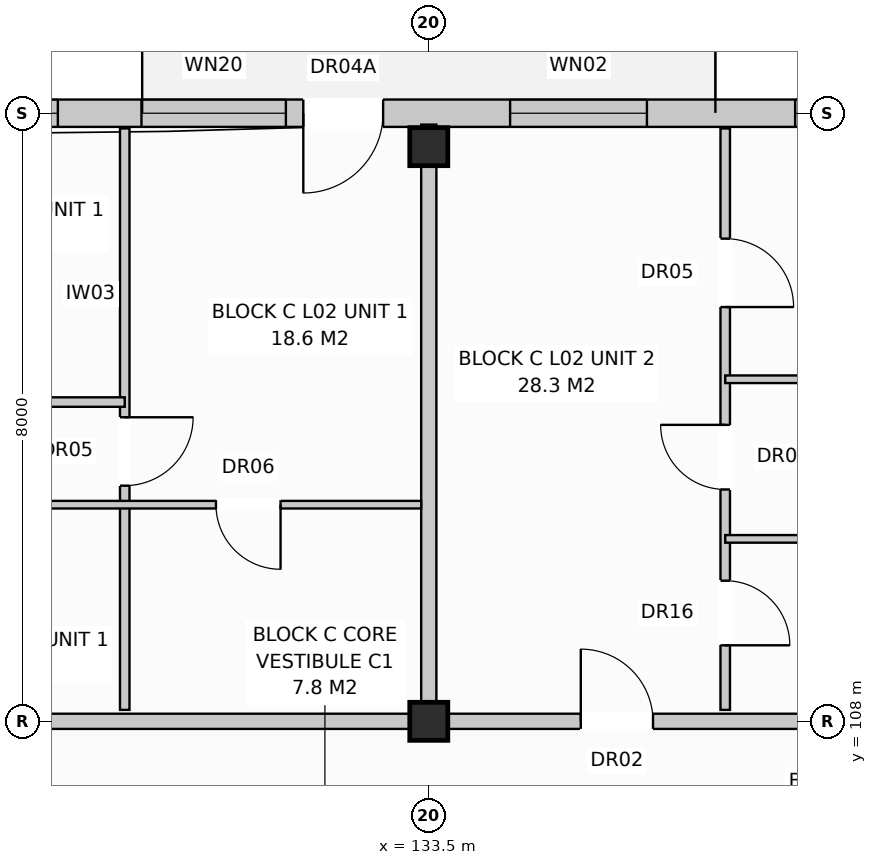
"""IFC4 building model, lengths in metres.
Left out: names, types, materials, properties, quantities, classifications, styles, units other than length and angle.
Written with IfcOpenShell. Run it as: python <this file> out.ifc"""

import sys

from ifc_helpers import new_model, si_unit, direction, frame, frame_2d, origin, origin_with_axes, origin_2d, place, context, subcontext, project, spatial, rectangle, extrude, element, fill, save


model = new_model("IFC4")
c1 = context("Model", 3, precision=1e-05, world=origin(), true_north=direction((0.0, 1.0)))
c2 = subcontext(c1, "Body", "Model", "MODEL_VIEW")
j1 = project(units=[si_unit("LENGTHUNIT", "METRE"), si_unit("PLANEANGLEUNIT", "RADIAN")], contexts=[c1])
p1 = place(None, origin())
s1 = spatial("IfcSite", under=j1, at=p1, CompositionType="ELEMENT")
p2 = place(p1, origin())
s2 = spatial("IfcBuilding", under=s1, at=p2, CompositionType="ELEMENT")
p3 = place(p2, frame((0.0, 0.0, 8.0)))
s3 = spatial("IfcBuildingStorey", under=s2, at=p3, CompositionType="ELEMENT", Elevation=8.0)
for number, where, z_axis, x_axis in (
    (1, (133.5, 108.0, 0.0), (0.0, 0.0, 1.0), (1.0, 0.0, 0.0)),
    (2, (133.5, 115.56, 0.0), (0.0, 0.0, 1.0), (1.0, 0.0, 0.0)),
):
    element("IfcColumn", number, at=place(p3, frame(where, z_axis=z_axis, x_axis=x_axis)), inside=s3, PredefinedType="COLUMN", context=c2, shape_type="SweptSolid", body=[
        extrude(rectangle(XDim=0.5, YDim=0.5, at=origin_2d()), origin(), (0.0, 0.0, 1.0), 3.2),
    ])
p4 = place(p3, frame((112.97, 116.0, 0.0), z_axis=(0.0, 0.0, 1.0), x_axis=(1.0, 0.0, 0.0)))
e3 = element("IfcWall", 3, at=p4, inside=s3, PredefinedType="STANDARD", context=c2, shape_type="SweptSolid", body=[
    extrude(rectangle(XDim=54.86, YDim=0.36, at=frame_2d((27.43, 0.0))), origin(), (0.0, 0.0, 1.0), 2.94),
])
p5 = place(p4, frame((4.876, 0.0, 0.0)))
e4 = element("IfcOpeningElement", 4, at=p5, cuts=e3, PredefinedType="OPENING", context=c2, shape_type="SweptSolid", body=[
    extrude(rectangle(XDim=1.05, YDim=2.12, at=frame_2d((0.525, 1.06))), frame((0.0, 0.192, 0.0), z_axis=(0.0, -1.0, 0.0), x_axis=(1.0, 0.0, 0.0)), (0.0, 0.0, 1.0), 0.384),
])
p6 = place(p4, frame((18.879, 0.0, 0.0)))
e5 = element("IfcOpeningElement", 5, at=p6, cuts=e3, PredefinedType="OPENING", context=c2, shape_type="SweptSolid", body=[
    extrude(rectangle(XDim=1.05, YDim=2.12, at=frame_2d((0.525, 1.06))), frame((0.0, 0.192, 0.0), z_axis=(0.0, -1.0, 0.0), x_axis=(1.0, 0.0, 0.0)), (0.0, 0.0, 1.0), 0.384),
])
p7 = place(p4, frame((31.379, 0.0, 0.0)))
e6 = element("IfcOpeningElement", 6, at=p7, cuts=e3, PredefinedType="OPENING", context=c2, shape_type="SweptSolid", body=[
    extrude(rectangle(XDim=1.05, YDim=2.12, at=frame_2d((0.525, 1.06))), frame((0.0, 0.192, 0.0), z_axis=(0.0, -1.0, 0.0), x_axis=(1.0, 0.0, 0.0)), (0.0, 0.0, 1.0), 0.384),
])
p8 = place(p4, frame((46.45, 0.0, 0.0)))
e7 = element("IfcOpeningElement", 7, at=p8, cuts=e3, PredefinedType="OPENING", context=c2, shape_type="SweptSolid", body=[
    extrude(rectangle(XDim=1.05, YDim=2.12, at=frame_2d((0.525, 1.06))), frame((0.0, 0.192, 0.0), z_axis=(0.0, -1.0, 0.0), x_axis=(1.0, 0.0, 0.0)), (0.0, 0.0, 1.0), 0.384),
])
p9 = place(p4, frame((2.45, 0.0, 0.72)))
e8 = element("IfcOpeningElement", 8, at=p9, cuts=e3, PredefinedType="OPENING", context=c2, shape_type="SweptSolid", body=[
    extrude(rectangle(XDim=1.1, YDim=1.5, at=frame_2d((0.55, 0.75))), frame((0.0, 0.192, 0.0), z_axis=(0.0, -1.0, 0.0), x_axis=(1.0, 0.0, 0.0)), (0.0, 0.0, 1.0), 0.384),
])
p10 = place(p4, frame((7.8, 0.0, 0.8)))
e9 = element("IfcOpeningElement", 9, at=p10, cuts=e3, PredefinedType="OPENING", context=c2, shape_type="SweptSolid", body=[
    extrude(rectangle(XDim=1.8, YDim=1.7, at=frame_2d((0.9, 0.85))), frame((0.0, 0.192, 0.0), z_axis=(0.0, -1.0, 0.0), x_axis=(1.0, 0.0, 0.0)), (0.0, 0.0, 1.0), 0.384),
])
p11 = place(p4, frame((14.55, 0.0, 0.72)))
e10 = element("IfcOpeningElement", 10, at=p11, cuts=e3, PredefinedType="OPENING", context=c2, shape_type="SweptSolid", body=[
    extrude(rectangle(XDim=1.1, YDim=1.5, at=frame_2d((0.55, 0.75))), frame((0.0, 0.192, 0.0), z_axis=(0.0, -1.0, 0.0), x_axis=(1.0, 0.0, 0.0)), (0.0, 0.0, 1.0), 0.384),
])
p12 = place(p4, frame((16.75, 0.0, 0.8)))
e11 = element("IfcOpeningElement", 11, at=p12, cuts=e3, PredefinedType="OPENING", context=c2, shape_type="SweptSolid", body=[
    extrude(rectangle(XDim=1.9, YDim=1.85, at=frame_2d((0.95, 0.925))), frame((0.0, 0.192, 0.0), z_axis=(0.0, -1.0, 0.0), x_axis=(1.0, 0.0, 0.0)), (0.0, 0.0, 1.0), 0.384),
])
p13 = place(p4, frame((21.6, 0.0, 0.8)))
e12 = element("IfcOpeningElement", 12, at=p13, cuts=e3, PredefinedType="OPENING", context=c2, shape_type="SweptSolid", body=[
    extrude(rectangle(XDim=1.8, YDim=1.7, at=frame_2d((0.9, 0.85))), frame((0.0, 0.192, 0.0), z_axis=(0.0, -1.0, 0.0), x_axis=(1.0, 0.0, 0.0)), (0.0, 0.0, 1.0), 0.384),
])
p14 = place(p4, frame((25.35, 0.0, 0.72)))
e13 = element("IfcOpeningElement", 13, at=p14, cuts=e3, PredefinedType="OPENING", context=c2, shape_type="SweptSolid", body=[
    extrude(rectangle(XDim=1.1, YDim=1.5, at=frame_2d((0.55, 0.75))), frame((0.0, 0.192, 0.0), z_axis=(0.0, -1.0, 0.0), x_axis=(1.0, 0.0, 0.0)), (0.0, 0.0, 1.0), 0.384),
])
p15 = place(p4, frame((29.55, 0.0, 0.72)))
e14 = element("IfcOpeningElement", 14, at=p15, cuts=e3, PredefinedType="OPENING", context=c2, shape_type="SweptSolid", body=[
    extrude(rectangle(XDim=1.1, YDim=1.5, at=frame_2d((0.55, 0.75))), frame((0.0, 0.192, 0.0), z_axis=(0.0, -1.0, 0.0), x_axis=(1.0, 0.0, 0.0)), (0.0, 0.0, 1.0), 0.384),
])
p16 = place(p4, frame((34.9, 0.0, 0.8)))
e15 = element("IfcOpeningElement", 15, at=p16, cuts=e3, PredefinedType="OPENING", context=c2, shape_type="SweptSolid", body=[
    extrude(rectangle(XDim=1.8, YDim=1.7, at=frame_2d((0.9, 0.85))), frame((0.0, 0.192, 0.0), z_axis=(0.0, -1.0, 0.0), x_axis=(1.0, 0.0, 0.0)), (0.0, 0.0, 1.0), 0.384),
])
p17 = place(p4, frame((38.45, 0.0, 0.72)))
e16 = element("IfcOpeningElement", 16, at=p17, cuts=e3, PredefinedType="OPENING", context=c2, shape_type="SweptSolid", body=[
    extrude(rectangle(XDim=1.1, YDim=1.5, at=frame_2d((0.55, 0.75))), frame((0.0, 0.192, 0.0), z_axis=(0.0, -1.0, 0.0), x_axis=(1.0, 0.0, 0.0)), (0.0, 0.0, 1.0), 0.384),
])
p18 = place(p4, frame((42.85, 0.0, 0.72)))
e17 = element("IfcOpeningElement", 17, at=p18, cuts=e3, PredefinedType="OPENING", context=c2, shape_type="SweptSolid", body=[
    extrude(rectangle(XDim=1.1, YDim=1.5, at=frame_2d((0.55, 0.75))), frame((0.0, 0.192, 0.0), z_axis=(0.0, -1.0, 0.0), x_axis=(1.0, 0.0, 0.0)), (0.0, 0.0, 1.0), 0.384),
])
p19 = place(p4, frame((49.2, 0.0, 0.8)))
e18 = element("IfcOpeningElement", 18, at=p19, cuts=e3, PredefinedType="OPENING", context=c2, shape_type="SweptSolid", body=[
    extrude(rectangle(XDim=1.8, YDim=1.7, at=frame_2d((0.9, 0.85))), frame((0.0, 0.192, 0.0), z_axis=(0.0, -1.0, 0.0), x_axis=(1.0, 0.0, 0.0)), (0.0, 0.0, 1.0), 0.384),
])
p20 = place(p4, frame((52.95, 0.0, 0.72)))
e19 = element("IfcOpeningElement", 19, at=p20, cuts=e3, PredefinedType="OPENING", context=c2, shape_type="SweptSolid", body=[
    extrude(rectangle(XDim=1.1, YDim=1.5, at=frame_2d((0.55, 0.75))), frame((0.0, 0.192, 0.0), z_axis=(0.0, -1.0, 0.0), x_axis=(1.0, 0.0, 0.0)), (0.0, 0.0, 1.0), 0.384),
])
p21 = place(p3, frame((133.5, 108.15, 0.0), z_axis=(0.0, 0.0, 1.0), x_axis=(0.0, 1.0, 0.0)))
e20 = element("IfcWall", 20, at=p21, inside=s3, PredefinedType="PARTITIONING", context=c2, shape_type="SweptSolid", body=[
    extrude(rectangle(XDim=7.7, YDim=0.2, at=frame_2d((3.85, 0.0))), origin(), (0.0, 0.0, 1.0), 2.94),
])
p22 = place(p3, frame((112.8, 108.0, 0.0), z_axis=(0.0, 0.0, 1.0), x_axis=(1.0, 0.0, 0.0)))
e21 = element("IfcWall", 21, at=p22, inside=s3, PredefinedType="PARTITIONING", context=c2, shape_type="SweptSolid", body=[
    extrude(rectangle(XDim=20.7, YDim=0.2, at=frame_2d((10.35, 0.0))), origin(), (0.0, 0.0, 1.0), 2.38),
])
p23 = place(p22, frame((2.4, 0.0, 0.0)))
e22 = element("IfcOpeningElement", 22, at=p23, cuts=e21, PredefinedType="OPENING", context=c2, shape_type="SweptSolid", body=[
    extrude(rectangle(XDim=0.95, YDim=2.15, at=frame_2d((0.475, 1.075))), frame((0.0, 0.112, 0.0), z_axis=(0.0, -1.0, 0.0), x_axis=(1.0, 0.0, 0.0)), (0.0, 0.0, 1.0), 0.224),
])
p24 = place(p3, frame((129.5, 108.15, 0.0), z_axis=(0.0, 0.0, 1.0), x_axis=(0.0, 1.0, 0.0)))
e23 = element("IfcWall", 23, at=p24, inside=s3, PredefinedType="PARTITIONING", context=c2, shape_type="SweptSolid", body=[
    extrude(rectangle(XDim=7.65, YDim=0.125, at=frame_2d((3.825, 0.0))), origin(), (0.0, 0.0, 1.0), 2.94),
])
p25 = place(p24, frame((2.95, 0.0, 0.0)))
e24 = element("IfcOpeningElement", 24, at=p25, cuts=e23, PredefinedType="OPENING", context=c2, shape_type="SweptSolid", body=[
    extrude(rectangle(XDim=0.9, YDim=2.1, at=frame_2d((0.45, 1.05))), frame((0.0, 0.074, 0.0), z_axis=(0.0, -1.0, 0.0), x_axis=(1.0, 0.0, 0.0)), (0.0, 0.0, 1.0), 0.149),
])
p26 = place(p3, frame((119.1, 110.85, 0.0), z_axis=(0.0, 0.0, 1.0), x_axis=(1.0, 0.0, 0.0)))
e25 = element("IfcWall", 25, at=p26, inside=s3, PredefinedType="PARTITIONING", context=c2, shape_type="SweptSolid", body=[
    extrude(rectangle(XDim=14.3, YDim=0.1, at=frame_2d((7.15, 0.0))), origin(), (0.0, 0.0, 1.0), 2.94),
])
p27 = place(p26, frame((1.6, 0.0, 0.0)))
e26 = element("IfcOpeningElement", 26, at=p27, cuts=e25, PredefinedType="OPENING", context=c2, shape_type="SweptSolid", body=[
    extrude(rectangle(XDim=0.9, YDim=2.1, at=frame_2d((0.45, 1.05))), frame((0.0, 0.062, 0.0), z_axis=(0.0, -1.0, 0.0), x_axis=(1.0, 0.0, 0.0)), (0.0, 0.0, 1.0), 0.124),
])
p28 = place(p26, frame((5.1, 0.0, 0.0)))
e27 = element("IfcOpeningElement", 27, at=p28, cuts=e25, PredefinedType="OPENING", context=c2, shape_type="SweptSolid", body=[
    extrude(rectangle(XDim=0.85, YDim=2.05, at=frame_2d((0.425, 1.025))), frame((0.0, 0.062, 0.0), z_axis=(0.0, -1.0, 0.0), x_axis=(1.0, 0.0, 0.0)), (0.0, 0.0, 1.0), 0.124),
])
p29 = place(p26, frame((8.2, 0.0, 0.0)))
e28 = element("IfcOpeningElement", 28, at=p29, cuts=e25, PredefinedType="OPENING", context=c2, shape_type="SweptSolid", body=[
    extrude(rectangle(XDim=0.85, YDim=2.05, at=frame_2d((0.425, 1.025))), frame((0.0, 0.062, 0.0), z_axis=(0.0, -1.0, 0.0), x_axis=(1.0, 0.0, 0.0)), (0.0, 0.0, 1.0), 0.124),
])
p30 = place(p26, frame((11.6, 0.0, 0.0)))
e29 = element("IfcOpeningElement", 29, at=p30, cuts=e25, PredefinedType="OPENING", context=c2, shape_type="SweptSolid", body=[
    extrude(rectangle(XDim=0.85, YDim=2.05, at=frame_2d((0.425, 1.025))), frame((0.0, 0.062, 0.0), z_axis=(0.0, -1.0, 0.0), x_axis=(1.0, 0.0, 0.0)), (0.0, 0.0, 1.0), 0.124),
])
p31 = place(p3, frame((119.1, 112.2, 0.0), z_axis=(0.0, 0.0, 1.0), x_axis=(1.0, 0.0, 0.0)))
e30 = element("IfcWall", 30, at=p31, inside=s3, PredefinedType="PARTITIONING", context=c2, shape_type="SweptSolid", body=[
    extrude(rectangle(XDim=10.4, YDim=0.125, at=frame_2d((5.2, 0.0))), origin(), (0.0, 0.0, 1.0), 2.94),
])
p32 = place(p31, frame((2.0, 0.0, 0.0)))
e31 = element("IfcOpeningElement", 31, at=p32, cuts=e30, PredefinedType="OPENING", context=c2, shape_type="SweptSolid", body=[
    extrude(rectangle(XDim=0.9, YDim=2.1, at=frame_2d((0.45, 1.05))), frame((0.0, 0.074, 0.0), z_axis=(0.0, -1.0, 0.0), x_axis=(1.0, 0.0, 0.0)), (0.0, 0.0, 1.0), 0.149),
])
p33 = place(p31, frame((7.2, 0.0, 0.0)))
e32 = element("IfcOpeningElement", 32, at=p33, cuts=e30, PredefinedType="OPENING", context=c2, shape_type="SweptSolid", body=[
    extrude(rectangle(XDim=0.9, YDim=2.1, at=frame_2d((0.45, 1.05))), frame((0.0, 0.074, 0.0), z_axis=(0.0, -1.0, 0.0), x_axis=(1.0, 0.0, 0.0)), (0.0, 0.0, 1.0), 0.149),
])
p34 = place(p3, frame((133.5, 108.0, 0.0), z_axis=(0.0, 0.0, 1.0), x_axis=(1.0, 0.0, 0.0)))
e33 = element("IfcWall", 33, at=p34, inside=s3, PredefinedType="PARTITIONING", context=c2, shape_type="SweptSolid", body=[
    extrude(rectangle(XDim=6.9, YDim=0.2, at=frame_2d((3.45, 0.0))), origin(), (0.0, 0.0, 1.0), 2.38),
])
p35 = place(p34, frame((2.0, 0.0, 0.0)))
e34 = element("IfcOpeningElement", 34, at=p35, cuts=e33, PredefinedType="OPENING", context=c2, shape_type="SweptSolid", body=[
    extrude(rectangle(XDim=0.95, YDim=2.15, at=frame_2d((0.475, 1.075))), frame((0.0, 0.112, 0.0), z_axis=(0.0, -1.0, 0.0), x_axis=(1.0, 0.0, 0.0)), (0.0, 0.0, 1.0), 0.224),
])
p36 = place(p3, frame((137.4, 108.15, 0.0), z_axis=(0.0, 0.0, 1.0), x_axis=(0.0, 1.0, 0.0)))
e35 = element("IfcWall", 35, at=p36, inside=s3, PredefinedType="PARTITIONING", context=c2, shape_type="SweptSolid", body=[
    extrude(rectangle(XDim=7.65, YDim=0.125, at=frame_2d((3.825, 0.0))), origin(), (0.0, 0.0, 1.0), 2.94),
])
p37 = place(p36, frame((0.85, 0.0, 0.0)))
e36 = element("IfcOpeningElement", 36, at=p37, cuts=e35, PredefinedType="OPENING", context=c2, shape_type="SweptSolid", body=[
    extrude(rectangle(XDim=0.85, YDim=2.1, at=frame_2d((0.425, 1.05))), frame((0.0, 0.074, 0.0), z_axis=(0.0, -1.0, 0.0), x_axis=(1.0, 0.0, 0.0)), (0.0, 0.0, 1.0), 0.149),
])
p38 = place(p36, frame((2.9, 0.0, 0.0)))
e37 = element("IfcOpeningElement", 37, at=p38, cuts=e35, PredefinedType="OPENING", context=c2, shape_type="SweptSolid", body=[
    extrude(rectangle(XDim=0.85, YDim=2.05, at=frame_2d((0.425, 1.025))), frame((0.0, 0.074, 0.0), z_axis=(0.0, -1.0, 0.0), x_axis=(1.0, 0.0, 0.0)), (0.0, 0.0, 1.0), 0.149),
])
p39 = place(p36, frame((5.3, 0.0, 0.0)))
e38 = element("IfcOpeningElement", 38, at=p39, cuts=e35, PredefinedType="OPENING", context=c2, shape_type="SweptSolid", body=[
    extrude(rectangle(XDim=0.9, YDim=2.1, at=frame_2d((0.45, 1.05))), frame((0.0, 0.074, 0.0), z_axis=(0.0, -1.0, 0.0), x_axis=(1.0, 0.0, 0.0)), (0.0, 0.0, 1.0), 0.149),
])
for number, where, z_axis, x_axis in (
    (39, (137.4, 110.4, 0.0), (0.0, 0.0, 1.0), (1.0, 0.0, 0.0)),
    (40, (137.4, 112.5, 0.0), (0.0, 0.0, 1.0), (1.0, 0.0, 0.0)),
):
    element("IfcWall", number, at=place(p3, frame(where, z_axis=z_axis, x_axis=x_axis)), inside=s3, PredefinedType="PARTITIONING", context=c2, shape_type="SweptSolid", body=[
        extrude(rectangle(XDim=2.9, YDim=0.1, at=frame_2d((1.45, 0.0))), origin(), (0.0, 0.0, 1.0), 2.94),
    ])
p40 = place(p6, frame((1.05, 0.0, 0.0), z_axis=(0.0, 0.0, 1.0), x_axis=(-1.0, 0.0, 0.0)))
e41 = element("IfcDoor", 41, at=p40, inside=s3, OperationType="SINGLE_SWING_LEFT", PredefinedType="DOOR", context=c2, shape_type="SweptSolid", body=[
    extrude(rectangle(XDim=1.05, YDim=2.12, at=frame_2d((0.525, 1.06))), frame((0.0, 0.025, 0.0), z_axis=(0.0, -1.0, 0.0), x_axis=(1.0, 0.0, 0.0)), (0.0, 0.0, 1.0), 0.05),
])
fill(e5, e41)
p41 = place(p11, origin_with_axes())
e42 = element("IfcWindow", 42, at=p41, inside=s3, PartitioningType="SINGLE_PANEL", PredefinedType="WINDOW", context=c2, shape_type="SweptSolid", body=[
    extrude(rectangle(XDim=1.1, YDim=1.5, at=frame_2d((0.55, 0.75))), frame((0.0, 0.03, 0.0), z_axis=(0.0, -1.0, 0.0), x_axis=(1.0, 0.0, 0.0)), (0.0, 0.0, 1.0), 0.06),
])
fill(e10, e42)
p42 = place(p12, origin_with_axes())
e43 = element("IfcWindow", 43, at=p42, inside=s3, PartitioningType="SINGLE_PANEL", PredefinedType="WINDOW", context=c2, shape_type="SweptSolid", body=[
    extrude(rectangle(XDim=1.9, YDim=1.85, at=frame_2d((0.95, 0.925))), frame((0.0, 0.03, 0.0), z_axis=(0.0, -1.0, 0.0), x_axis=(1.0, 0.0, 0.0)), (0.0, 0.0, 1.0), 0.06),
])
fill(e11, e43)
p43 = place(p13, origin_with_axes())
e44 = element("IfcWindow", 44, at=p43, inside=s3, PartitioningType="SINGLE_PANEL", PredefinedType="WINDOW", context=c2, shape_type="SweptSolid", body=[
    extrude(rectangle(XDim=1.8, YDim=1.7, at=frame_2d((0.9, 0.85))), frame((0.0, 0.03, 0.0), z_axis=(0.0, -1.0, 0.0), x_axis=(1.0, 0.0, 0.0)), (0.0, 0.0, 1.0), 0.06),
])
fill(e12, e44)
p44 = place(p14, origin_with_axes())
e45 = element("IfcWindow", 45, at=p44, inside=s3, PartitioningType="SINGLE_PANEL", PredefinedType="WINDOW", context=c2, shape_type="SweptSolid", body=[
    extrude(rectangle(XDim=1.1, YDim=1.5, at=frame_2d((0.55, 0.75))), frame((0.0, 0.03, 0.0), z_axis=(0.0, -1.0, 0.0), x_axis=(1.0, 0.0, 0.0)), (0.0, 0.0, 1.0), 0.06),
])
fill(e13, e45)
p45 = place(p25, frame((0.9, 0.0, 0.0), z_axis=(0.0, 0.0, 1.0), x_axis=(-1.0, 0.0, 0.0)))
e46 = element("IfcDoor", 46, at=p45, inside=s3, OperationType="SINGLE_SWING_RIGHT", PredefinedType="DOOR", context=c2, shape_type="SweptSolid", body=[
    extrude(rectangle(XDim=0.9, YDim=2.1, at=frame_2d((0.45, 1.05))), frame((0.0, 0.025, 0.0), z_axis=(0.0, -1.0, 0.0), x_axis=(1.0, 0.0, 0.0)), (0.0, 0.0, 1.0), 0.05),
])
fill(e24, e46)
p46 = place(p30, frame((0.85, 0.0, 0.0), z_axis=(0.0, 0.0, 1.0), x_axis=(-1.0, 0.0, 0.0)))
e47 = element("IfcDoor", 47, at=p46, inside=s3, OperationType="SINGLE_SWING_RIGHT", PredefinedType="DOOR", context=c2, shape_type="SweptSolid", body=[
    extrude(rectangle(XDim=0.85, YDim=2.05, at=frame_2d((0.425, 1.025))), frame((0.0, 0.025, 0.0), z_axis=(0.0, -1.0, 0.0), x_axis=(1.0, 0.0, 0.0)), (0.0, 0.0, 1.0), 0.05),
])
fill(e29, e47)
p47 = place(p35, origin_with_axes())
e48 = element("IfcDoor", 48, at=p47, inside=s3, OperationType="SINGLE_SWING_LEFT", PredefinedType="DOOR", context=c2, shape_type="SweptSolid", body=[
    extrude(rectangle(XDim=0.95, YDim=2.15, at=frame_2d((0.475, 1.075))), frame((0.0, 0.025, 0.0), z_axis=(0.0, -1.0, 0.0), x_axis=(1.0, 0.0, 0.0)), (0.0, 0.0, 1.0), 0.05),
])
fill(e34, e48)
p48 = place(p37, frame((0.85, 0.0, 0.0), z_axis=(0.0, 0.0, 1.0), x_axis=(-1.0, 0.0, 0.0)))
e49 = element("IfcDoor", 49, at=p48, inside=s3, OperationType="SINGLE_SWING_LEFT", PredefinedType="DOOR", context=c2, shape_type="SweptSolid", body=[
    extrude(rectangle(XDim=0.85, YDim=2.1, at=frame_2d((0.425, 1.05))), frame((0.0, 0.025, 0.0), z_axis=(0.0, -1.0, 0.0), x_axis=(1.0, 0.0, 0.0)), (0.0, 0.0, 1.0), 0.05),
])
fill(e36, e49)
p49 = place(p38, origin_with_axes())
e50 = element("IfcDoor", 50, at=p49, inside=s3, OperationType="SINGLE_SWING_RIGHT", PredefinedType="DOOR", context=c2, shape_type="SweptSolid", body=[
    extrude(rectangle(XDim=0.85, YDim=2.05, at=frame_2d((0.425, 1.025))), frame((0.0, 0.025, 0.0), z_axis=(0.0, -1.0, 0.0), x_axis=(1.0, 0.0, 0.0)), (0.0, 0.0, 1.0), 0.05),
])
fill(e37, e50)
p50 = place(p39, frame((0.9, 0.0, 0.0), z_axis=(0.0, 0.0, 1.0), x_axis=(-1.0, 0.0, 0.0)))
e51 = element("IfcDoor", 51, at=p50, inside=s3, OperationType="SINGLE_SWING_LEFT", PredefinedType="DOOR", context=c2, shape_type="SweptSolid", body=[
    extrude(rectangle(XDim=0.9, YDim=2.1, at=frame_2d((0.45, 1.05))), frame((0.0, 0.025, 0.0), z_axis=(0.0, -1.0, 0.0), x_axis=(1.0, 0.0, 0.0)), (0.0, 0.0, 1.0), 0.05),
])
fill(e38, e51)
save(model, sys.argv[1])
